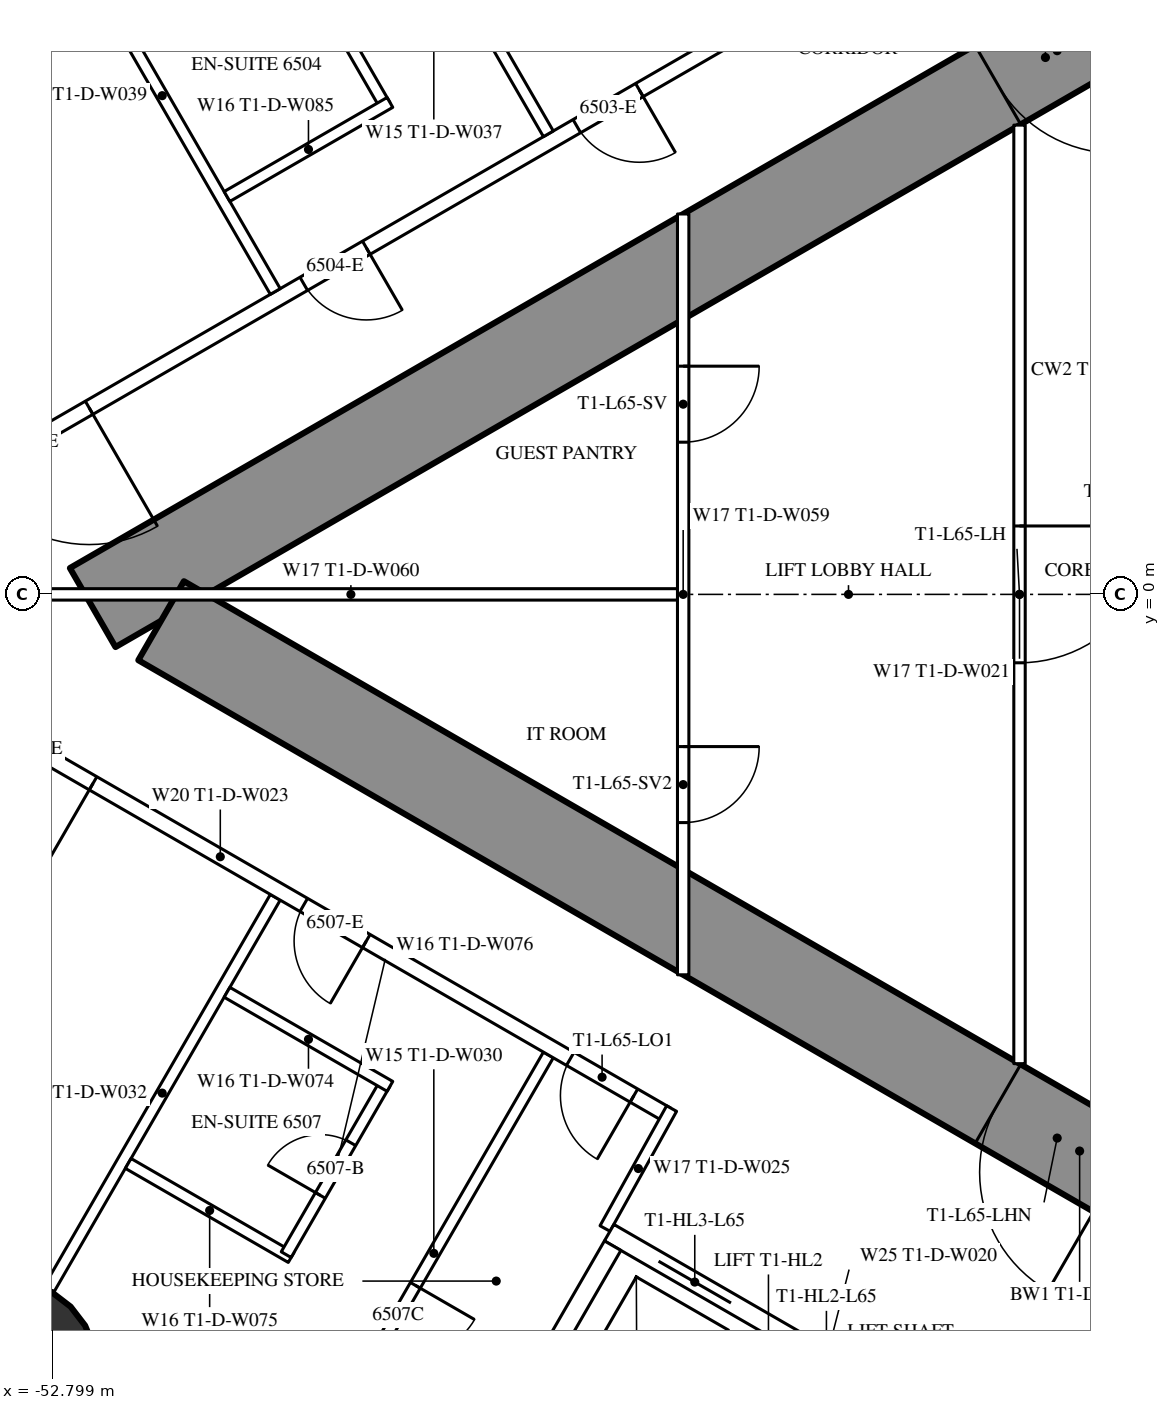
"""IFC4 building model, lengths in metres.
Left out: names, types, materials, properties, quantities, classifications, styles, units other than length and angle.
Written with IfcOpenShell. Run it as: python <this file> out.ifc"""

import sys

from ifc_helpers import new_model, si_unit, direction, frame, frame_2d, origin, origin_2d, place, context, subcontext, project, spatial, rectangle, circle, extrude, element, fill, save


model = new_model("IFC4")
c1 = context("Model", 3, precision=1e-05, world=origin(), true_north=direction((0.0, 1.0)))
c2 = subcontext(c1, "Body", "Model", "MODEL_VIEW")
j1 = project(units=[si_unit("LENGTHUNIT", "METRE"), si_unit("PLANEANGLEUNIT", "RADIAN")], contexts=[c1])
p1 = place(None, origin())
s1 = spatial("IfcSite", under=j1, at=p1, CompositionType="ELEMENT")
p2 = place(p1, origin())
s2 = spatial("IfcBuilding", under=s1, at=p2, CompositionType="ELEMENT")
p3 = place(p2, frame((0.0, 0.0, 244.1)))
s3 = spatial("IfcBuildingStorey", under=s2, at=p3, CompositionType="ELEMENT", Elevation=244.1)
p4 = place(p3, frame((-53.408, -10.219, 0.0), z_axis=(0.0, 0.0, 1.0), x_axis=(1.0, 0.0, 0.0)))
e1 = element("IfcColumn", 1, at=p4, inside=s3, PredefinedType="COLUMN", context=c2, shape_type="SweptSolid", body=[
    extrude(circle(Radius=1.2, at=origin_2d()), origin(), (0.0, 0.0, 1.0), 3.6),
])
p5 = place(p3, frame((-27.2, 14.3, 0.0), z_axis=(0.0, 0.0, 1.0), x_axis=(-0.866026593062, -0.499997940104, 0.0)))
e2 = element("IfcWall", 2, at=p5, inside=s3, PredefinedType="SHEAR", context=c2, shape_type="SweptSolid", body=[
    extrude(rectangle(XDim=28.946, YDim=1.2, at=frame_2d((14.473, 0.0))), origin(), (0.0, 0.0, 1.0), 3.6),
])
p6 = place(p5, frame((4.6, 0.0, 0.0)))
e3 = element("IfcOpeningElement", 3, at=p6, cuts=e2, PredefinedType="OPENING", context=c2, shape_type="SweptSolid", body=[
    extrude(rectangle(XDim=1.0, YDim=2.2, at=frame_2d((0.5, 1.1))), frame((0.0, 0.61, 0.0), z_axis=(0.0, -1.0, 0.0), x_axis=(1.0, 0.0, 0.0)), (0.0, 0.0, 1.0), 1.22),
])
p7 = place(p5, frame((13.395, 0.0, 0.0)))
e4 = element("IfcOpeningElement", 4, at=p7, cuts=e2, PredefinedType="OPENING", context=c2, shape_type="SweptSolid", body=[
    extrude(rectangle(XDim=1.8, YDim=2.2, at=frame_2d((0.9, 1.1))), frame((0.0, 0.61, 0.0), z_axis=(0.0, -1.0, 0.0), x_axis=(1.0, 0.0, 0.0)), (0.0, 0.0, 1.0), 1.22),
])
p8 = place(p3, frame((-27.2, -14.3, 0.0), z_axis=(0.0, 0.0, 1.0), x_axis=(-0.866024021859, 0.500002393557, 0.0)))
e5 = element("IfcWall", 5, at=p8, inside=s3, PredefinedType="SHEAR", context=c2, shape_type="SweptSolid", body=[
    extrude(rectangle(XDim=27.907, YDim=1.2, at=frame_2d((13.954, 0.0))), origin(), (0.0, 0.0, 1.0), 3.6),
])
p9 = place(p8, frame((4.6, 0.0, 0.0)))
e6 = element("IfcOpeningElement", 6, at=p9, cuts=e5, PredefinedType="OPENING", context=c2, shape_type="SweptSolid", body=[
    extrude(rectangle(XDim=1.0, YDim=2.2, at=frame_2d((0.5, 1.1))), frame((0.0, 0.61, 0.0), z_axis=(0.0, -1.0, 0.0), x_axis=(1.0, 0.0, 0.0)), (0.0, 0.0, 1.0), 1.22),
])
p10 = place(p8, frame((13.395, 0.0, 0.0)))
e7 = element("IfcOpeningElement", 7, at=p10, cuts=e5, PredefinedType="OPENING", context=c2, shape_type="SweptSolid", body=[
    extrude(rectangle(XDim=1.8, YDim=2.2, at=frame_2d((0.9, 1.1))), frame((0.0, 0.61, 0.0), z_axis=(0.0, -1.0, 0.0), x_axis=(1.0, 0.0, 0.0)), (0.0, 0.0, 1.0), 1.22),
])
p11 = place(p3, frame((-28.737, 16.068, 0.0), z_axis=(0.0, 0.0, 1.0), x_axis=(-0.866026057212, -0.499998868229, 0.0)))
e8 = element("IfcWall", 8, at=p11, inside=s3, PredefinedType="PARTITIONING", context=c2, shape_type="SweptSolid", body=[
    extrude(rectangle(XDim=32.137, YDim=0.2, at=frame_2d((16.068, 0.0))), origin(), (0.0, 0.0, 1.0), 3.35),
])
p12 = place(p11, frame((1.08, 0.0, 0.0)))
e9 = element("IfcOpeningElement", 9, at=p12, cuts=e8, PredefinedType="OPENING", context=c2, shape_type="SweptSolid", body=[
    extrude(rectangle(XDim=1.8, YDim=2.04, at=frame_2d((0.9, 1.02))), frame((0.0, 0.11, 0.0), z_axis=(0.0, -1.0, 0.0), x_axis=(1.0, 0.0, 0.0)), (0.0, 0.0, 1.0), 0.22),
])
p13 = place(p11, frame((6.86, 0.0, 0.0)))
e10 = element("IfcOpeningElement", 10, at=p13, cuts=e8, PredefinedType="OPENING", context=c2, shape_type="SweptSolid", body=[
    extrude(rectangle(XDim=1.0, YDim=2.2, at=frame_2d((0.5, 1.1))), frame((0.0, 0.11, 0.0), z_axis=(0.0, -1.0, 0.0), x_axis=(1.0, 0.0, 0.0)), (0.0, 0.0, 1.0), 0.22),
])
p14 = place(p11, frame((18.867, 0.0, 0.0)))
e11 = element("IfcOpeningElement", 11, at=p14, cuts=e8, PredefinedType="OPENING", context=c2, shape_type="SweptSolid", body=[
    extrude(rectangle(XDim=0.95, YDim=2.2, at=frame_2d((0.475, 1.1))), frame((0.0, 0.11, 0.0), z_axis=(0.0, -1.0, 0.0), x_axis=(1.0, 0.0, 0.0)), (0.0, 0.0, 1.0), 0.22),
])
p15 = place(p11, frame((23.015, 0.0, 0.0)))
e12 = element("IfcOpeningElement", 12, at=p15, cuts=e8, PredefinedType="OPENING", context=c2, shape_type="SweptSolid", body=[
    extrude(rectangle(XDim=0.95, YDim=2.2, at=frame_2d((0.475, 1.1))), frame((0.0, 0.11, 0.0), z_axis=(0.0, -1.0, 0.0), x_axis=(1.0, 0.0, 0.0)), (0.0, 0.0, 1.0), 0.22),
])
p16 = place(p11, frame((27.226, 0.0, 0.0)))
e13 = element("IfcOpeningElement", 13, at=p16, cuts=e8, PredefinedType="OPENING", context=c2, shape_type="SweptSolid", body=[
    extrude(rectangle(XDim=1.8, YDim=2.2, at=frame_2d((0.9, 1.1))), frame((0.0, 0.11, 0.0), z_axis=(0.0, -1.0, 0.0), x_axis=(1.0, 0.0, 0.0)), (0.0, 0.0, 1.0), 0.22),
])
p17 = place(p3, frame((-46.274, 6.059, 0.0), z_axis=(0.0, 0.0, 1.0), x_axis=(-0.500020471368, 0.866013584312, 0.0)))
e14 = element("IfcWall", 14, at=p17, inside=s3, PredefinedType="PARTITIONING", context=c2, shape_type="SweptSolid", body=[
    extrude(rectangle(XDim=6.028, YDim=0.15, at=frame_2d((3.014, 0.0))), origin(), (0.0, 0.0, 1.0), 2.45),
])
p18 = place(p3, frame((-49.866, 3.985, 0.0), z_axis=(0.0, 0.0, 1.0), x_axis=(-0.500000694566, 0.866025002776, 0.0)))
e15 = element("IfcWall", 15, at=p18, inside=s3, PredefinedType="PARTITIONING", context=c2, shape_type="SweptSolid", body=[
    extrude(rectangle(XDim=5.95, YDim=0.15, at=frame_2d((2.975, 0.0))), origin(), (0.0, 0.0, 1.0), 2.45),
])
p19 = place(p3, frame((-46.274, -6.059, 0.0), z_axis=(0.0, 0.0, 1.0), x_axis=(-0.500020471368, -0.866013584312, 0.0)))
e16 = element("IfcWall", 16, at=p19, inside=s3, PredefinedType="PARTITIONING", context=c2, shape_type="SweptSolid", body=[
    extrude(rectangle(XDim=6.028, YDim=0.15, at=frame_2d((3.014, 0.0))), origin(), (0.0, 0.0, 1.0), 2.45),
])
p20 = place(p19, frame((3.5, 0.0, 0.0)))
e17 = element("IfcOpeningElement", 17, at=p20, cuts=e16, PredefinedType="OPENING", context=c2, shape_type="SweptSolid", body=[
    extrude(rectangle(XDim=0.9, YDim=2.2, at=frame_2d((0.45, 1.1))), frame((0.0, 0.085, 0.0), z_axis=(0.0, -1.0, 0.0), x_axis=(1.0, 0.0, 0.0)), (0.0, 0.0, 1.0), 0.17),
])
p21 = place(p3, frame((-49.866, -3.985, 0.0), z_axis=(0.0, 0.0, 1.0), x_axis=(-0.500000694566, -0.866025002776, 0.0)))
e18 = element("IfcWall", 18, at=p21, inside=s3, PredefinedType="PARTITIONING", context=c2, shape_type="SweptSolid", body=[
    extrude(rectangle(XDim=5.95, YDim=0.15, at=frame_2d((2.975, 0.0))), origin(), (0.0, 0.0, 1.0), 2.45),
])
p22 = place(p3, frame((-44.715, -6.844, 0.0), z_axis=(0.0, 0.0, 1.0), x_axis=(-0.866025261224, 0.500000246922, 0.0)))
e19 = element("IfcWall", 19, at=p22, inside=s3, PredefinedType="PARTITIONING", context=c2, shape_type="SweptSolid", body=[
    extrude(rectangle(XDim=13.567, YDim=0.2, at=frame_2d((6.783, 0.0))), origin(), (0.0, 0.0, 1.0), 3.35),
])
p23 = place(p22, frame((8.716, 0.0, 0.0)))
e20 = element("IfcOpeningElement", 20, at=p23, cuts=e19, PredefinedType="OPENING", context=c2, shape_type="SweptSolid", body=[
    extrude(rectangle(XDim=1.8, YDim=2.2, at=frame_2d((0.9, 1.1))), frame((0.0, 0.11, 0.0), z_axis=(0.0, -1.0, 0.0), x_axis=(1.0, 0.0, 0.0)), (0.0, 0.0, 1.0), 0.22),
])
p24 = place(p22, frame((4.565, 0.0, 0.0)))
e21 = element("IfcOpeningElement", 21, at=p24, cuts=e19, PredefinedType="OPENING", context=c2, shape_type="SweptSolid", body=[
    extrude(rectangle(XDim=0.95, YDim=2.2, at=frame_2d((0.475, 1.1))), frame((0.0, 0.11, 0.0), z_axis=(0.0, -1.0, 0.0), x_axis=(1.0, 0.0, 0.0)), (0.0, 0.0, 1.0), 0.22),
])
p25 = place(p22, frame((0.5, 0.0, 0.0)))
e22 = element("IfcOpeningElement", 22, at=p25, cuts=e19, PredefinedType="OPENING", context=c2, shape_type="SweptSolid", body=[
    extrude(rectangle(XDim=0.967, YDim=2.2, at=frame_2d((0.483, 1.1))), frame((0.0, 0.11, 0.0), z_axis=(0.0, -1.0, 0.0), x_axis=(1.0, 0.0, 0.0)), (0.0, 0.0, 1.0), 0.22),
])
p26 = place(p3, frame((-44.652, -6.764, 0.0), z_axis=(0.0, 0.0, 1.0), x_axis=(-0.485424724123, -0.874278466629, 0.0)))
e23 = element("IfcWall", 23, at=p26, inside=s3, PredefinedType="PARTITIONING", context=c2, shape_type="SweptSolid", body=[
    extrude(rectangle(XDim=1.805, YDim=0.15, at=frame_2d((0.903, 0.0))), origin(), (0.0, 0.0, 1.0), 3.35),
])
p27 = place(p3, frame((-48.423, 6.435, 0.0), z_axis=(0.0, 0.0, 1.0), x_axis=(-0.500006934395, 0.866021400173, 0.0)))
e24 = element("IfcWall", 24, at=p27, inside=s3, PredefinedType="PARTITIONING", context=c2, shape_type="SweptSolid", body=[
    extrude(rectangle(XDim=2.6, YDim=0.15, at=frame_2d((1.3, 0.0))), origin(), (0.0, 0.0, 1.0), 3.35),
])
p28 = place(p27, frame((0.9, 0.0, 0.0)))
e25 = element("IfcOpeningElement", 25, at=p28, cuts=e24, PredefinedType="OPENING", context=c2, shape_type="SweptSolid", body=[
    extrude(rectangle(XDim=0.8, YDim=2.2, at=frame_2d((0.4, 1.1))), frame((0.0, 0.085, 0.0), z_axis=(0.0, -1.0, 0.0), x_axis=(1.0, 0.0, 0.0)), (0.0, 0.0, 1.0), 0.17),
])
for number, where, z_axis, x_axis in (
    (26, (-48.358, 6.472, 0.0), (0.0, 0.0, 1.0), (-0.866, -0.5, 0.0)),
    (27, (-49.658, -8.724, 0.0), (0.0, 0.0, 1.0), (-0.866, 0.5, 0.0)),
):
    element("IfcWall", number, at=place(p3, frame(where, z_axis=z_axis, x_axis=x_axis)), inside=s3, PredefinedType="PARTITIONING", context=c2, shape_type="SweptSolid", body=[
        extrude(rectangle(XDim=2.475, YDim=0.15, at=frame_2d((1.238, 0.0))), origin(), (0.0, 0.0, 1.0), 3.35),
    ])
p29 = place(p3, frame((-48.423, -6.435, 0.0), z_axis=(0.0, 0.0, 1.0), x_axis=(-0.500006934395, -0.866021400173, 0.0)))
e28 = element("IfcWall", 28, at=p29, inside=s3, PredefinedType="PARTITIONING", context=c2, shape_type="SweptSolid", body=[
    extrude(rectangle(XDim=2.6, YDim=0.15, at=frame_2d((1.3, 0.0))), origin(), (0.0, 0.0, 1.0), 3.35),
])
p30 = place(p29, frame((0.9, 0.0, 0.0)))
e29 = element("IfcOpeningElement", 29, at=p30, cuts=e28, PredefinedType="OPENING", context=c2, shape_type="SweptSolid", body=[
    extrude(rectangle(XDim=0.8, YDim=2.2, at=frame_2d((0.4, 1.1))), frame((0.0, 0.085, 0.0), z_axis=(0.0, -1.0, 0.0), x_axis=(1.0, 0.0, 0.0)), (0.0, 0.0, 1.0), 0.17),
])
p31 = place(p3, frame((-48.358, -6.472, 0.0), z_axis=(0.0, 0.0, 1.0), x_axis=(-0.866073894602, 0.499916002032, 0.0)))
e30 = element("IfcWall", 30, at=p31, inside=s3, PredefinedType="PARTITIONING", context=c2, shape_type="SweptSolid", body=[
    extrude(rectangle(XDim=2.475, YDim=0.15, at=frame_2d((1.238, 0.0))), origin(), (0.0, 0.0, 1.0), 2.5),
])
p32 = place(p3, frame((-40.075, 6.174, 0.0), z_axis=(0.0, 0.0, 1.0), x_axis=(0.0, -1.0, 0.0)))
e31 = element("IfcWall", 31, at=p32, inside=s3, PredefinedType="PARTITIONING", context=c2, shape_type="SweptSolid", body=[
    extrude(rectangle(XDim=12.348, YDim=0.15, at=frame_2d((6.174, 0.0))), origin(), (0.0, 0.0, 1.0), 3.35),
])
p33 = place(p32, frame((5.274, 0.0, 0.0)))
e32 = element("IfcOpeningElement", 32, at=p33, cuts=e31, PredefinedType="OPENING", context=c2, shape_type="SweptSolid", body=[
    extrude(rectangle(XDim=1.8, YDim=2.2, at=frame_2d((0.9, 1.1))), frame((0.0, 0.085, 0.0), z_axis=(0.0, -1.0, 0.0), x_axis=(1.0, 0.0, 0.0)), (0.0, 0.0, 1.0), 0.17),
])
p34 = place(p3, frame((-44.5, 5.005, 0.0), z_axis=(0.0, 0.0, 1.0), x_axis=(0.0, -1.0, 0.0)))
e33 = element("IfcWall", 33, at=p34, inside=s3, PredefinedType="PARTITIONING", context=c2, shape_type="SweptSolid", body=[
    extrude(rectangle(XDim=10.009, YDim=0.15, at=frame_2d((5.005, 0.0))), origin(), (0.0, 0.0, 1.0), 2.5),
])
p35 = place(p34, frame((2.002, 0.0, 0.0)))
e34 = element("IfcOpeningElement", 34, at=p35, cuts=e33, PredefinedType="OPENING", context=c2, shape_type="SweptSolid", body=[
    extrude(rectangle(XDim=1.0, YDim=2.2, at=frame_2d((0.5, 1.1))), frame((0.0, 0.085, 0.0), z_axis=(0.0, -1.0, 0.0), x_axis=(1.0, 0.0, 0.0)), (0.0, 0.0, 1.0), 0.17),
])
p36 = place(p34, frame((7.007, 0.0, 0.0)))
e35 = element("IfcOpeningElement", 35, at=p36, cuts=e33, PredefinedType="OPENING", context=c2, shape_type="SweptSolid", body=[
    extrude(rectangle(XDim=1.0, YDim=2.2, at=frame_2d((0.5, 1.1))), frame((0.0, 0.085, 0.0), z_axis=(0.0, -1.0, 0.0), x_axis=(1.0, 0.0, 0.0)), (0.0, 0.0, 1.0), 0.17),
])
p37 = place(p3, frame((-44.575, 0.0, 0.0), z_axis=(0.0, 0.0, 1.0), x_axis=(-1.0, 0.0, 0.0)))
e36 = element("IfcWall", 36, at=p37, inside=s3, PredefinedType="PARTITIONING", context=c2, shape_type="SweptSolid", body=[
    extrude(rectangle(XDim=8.593, YDim=0.15, at=frame_2d((4.297, 0.0))), origin(), (0.0, 0.0, 1.0), 2.45),
])
p38 = place(p3, frame((-39.758, -11.697, 0.0), z_axis=(0.0, 0.0, 1.0), x_axis=(-0.866024194504, 0.500002094529, 0.0)))
e37 = element("IfcWall", 37, at=p38, inside=s3, PredefinedType="PARTITIONING", context=c2, shape_type="SweptSolid", body=[
    extrude(rectangle(XDim=6.6, YDim=0.25, at=frame_2d((3.3, 0.0))), origin(), (0.0, 0.0, 1.0), 3.35),
])
p39 = place(p38, frame((0.75, 0.0, 0.0)))
e38 = element("IfcOpeningElement", 38, at=p39, cuts=e37, PredefinedType="OPENING", context=c2, shape_type="SweptSolid", body=[
    extrude(rectangle(XDim=1.1, YDim=2.2, at=frame_2d((0.55, 1.1))), frame((0.0, 0.135, 0.0), z_axis=(0.0, -1.0, 0.0), x_axis=(1.0, 0.0, 0.0)), (0.0, 0.0, 1.0), 0.27),
])
p40 = place(p38, frame((2.75, 0.0, 0.0)))
e39 = element("IfcOpeningElement", 39, at=p40, cuts=e37, PredefinedType="OPENING", context=c2, shape_type="SweptSolid", body=[
    extrude(rectangle(XDim=1.1, YDim=2.2, at=frame_2d((0.55, 1.1))), frame((0.0, 0.135, 0.0), z_axis=(0.0, -1.0, 0.0), x_axis=(1.0, 0.0, 0.0)), (0.0, 0.0, 1.0), 0.27),
])
p41 = place(p38, frame((4.75, 0.0, 0.0)))
e40 = element("IfcOpeningElement", 40, at=p41, cuts=e37, PredefinedType="OPENING", context=c2, shape_type="SweptSolid", body=[
    extrude(rectangle(XDim=1.1, YDim=2.2, at=frame_2d((0.55, 1.1))), frame((0.0, 0.135, 0.0), z_axis=(0.0, -1.0, 0.0), x_axis=(1.0, 0.0, 0.0)), (0.0, 0.0, 1.0), 0.27),
])
p42 = place(p3, frame((-45.428, -8.568, 0.0), z_axis=(0.0, 0.0, 1.0), x_axis=(-0.499929347863, -0.866066190972, 0.0)))
e41 = element("IfcWall", 41, at=p42, inside=s3, PredefinedType="PARTITIONING", context=c2, shape_type="SweptSolid", body=[
    extrude(rectangle(XDim=3.201, YDim=0.25, at=frame_2d((1.6, 0.0))), origin(), (0.0, 0.0, 1.0), 3.35),
])
p43 = place(p14, origin())
e42 = element("IfcDoor", 42, at=p43, inside=s3, OperationType="SINGLE_SWING_LEFT", PredefinedType="DOOR", context=c2, shape_type="SweptSolid", body=[
    extrude(rectangle(XDim=0.95, YDim=2.2, at=frame_2d((0.475, 1.1))), frame((0.0, 0.025, 0.0), z_axis=(0.0, -1.0, 0.0), x_axis=(1.0, 0.0, 0.0)), (0.0, 0.0, 1.0), 0.05),
])
fill(e11, e42)
p44 = place(p15, origin())
e43 = element("IfcDoor", 43, at=p44, inside=s3, OperationType="SINGLE_SWING_LEFT", PredefinedType="DOOR", context=c2, shape_type="SweptSolid", body=[
    extrude(rectangle(XDim=0.95, YDim=2.2, at=frame_2d((0.475, 1.1))), frame((0.0, 0.025, 0.0), z_axis=(0.0, -1.0, 0.0), x_axis=(1.0, 0.0, 0.0)), (0.0, 0.0, 1.0), 0.05),
])
fill(e12, e43)
p45 = place(p16, origin())
e44 = element("IfcDoor", 44, at=p45, inside=s3, OperationType="DOUBLE_DOOR_SINGLE_SWING", PredefinedType="DOOR", context=c2, shape_type="SweptSolid", body=[
    extrude(rectangle(XDim=1.8, YDim=2.2, at=frame_2d((0.9, 1.1))), frame((0.0, 0.025, 0.0), z_axis=(0.0, -1.0, 0.0), x_axis=(1.0, 0.0, 0.0)), (0.0, 0.0, 1.0), 0.05),
])
fill(e13, e44)
p46 = place(p23, origin())
e45 = element("IfcDoor", 45, at=p46, inside=s3, OperationType="DOUBLE_DOOR_SINGLE_SWING", PredefinedType="DOOR", context=c2, shape_type="SweptSolid", body=[
    extrude(rectangle(XDim=1.8, YDim=2.2, at=frame_2d((0.9, 1.1))), frame((0.0, 0.025, 0.0), z_axis=(0.0, -1.0, 0.0), x_axis=(1.0, 0.0, 0.0)), (0.0, 0.0, 1.0), 0.05),
])
fill(e20, e45)
p47 = place(p30, origin())
e46 = element("IfcDoor", 46, at=p47, inside=s3, OperationType="SINGLE_SWING_RIGHT", PredefinedType="DOOR", context=c2, shape_type="SweptSolid", body=[
    extrude(rectangle(XDim=0.8, YDim=2.2, at=frame_2d((0.4, 1.1))), frame((0.0, 0.025, 0.0), z_axis=(0.0, -1.0, 0.0), x_axis=(1.0, 0.0, 0.0)), (0.0, 0.0, 1.0), 0.05),
])
fill(e29, e46)
p48 = place(p24, origin())
e47 = element("IfcDoor", 47, at=p48, inside=s3, OperationType="SINGLE_SWING_LEFT", PredefinedType="DOOR", context=c2, shape_type="SweptSolid", body=[
    extrude(rectangle(XDim=0.95, YDim=2.2, at=frame_2d((0.475, 1.1))), frame((0.0, 0.025, 0.0), z_axis=(0.0, -1.0, 0.0), x_axis=(1.0, 0.0, 0.0)), (0.0, 0.0, 1.0), 0.05),
])
fill(e21, e47)
p49 = place(p25, origin())
e48 = element("IfcDoor", 48, at=p49, inside=s3, OperationType="SINGLE_SWING_LEFT", PredefinedType="DOOR", context=c2, shape_type="SweptSolid", body=[
    extrude(rectangle(XDim=0.967, YDim=2.2, at=frame_2d((0.483, 1.1))), frame((0.0, 0.025, 0.0), z_axis=(0.0, -1.0, 0.0), x_axis=(1.0, 0.0, 0.0)), (0.0, 0.0, 1.0), 0.05),
])
fill(e22, e48)
p50 = place(p20, origin())
e49 = element("IfcDoor", 49, at=p50, inside=s3, OperationType="SINGLE_SWING_LEFT", PredefinedType="DOOR", context=c2, shape_type="SweptSolid", body=[
    extrude(rectangle(XDim=0.9, YDim=2.2, at=frame_2d((0.45, 1.1))), frame((0.0, 0.025, 0.0), z_axis=(0.0, -1.0, 0.0), x_axis=(1.0, 0.0, 0.0)), (0.0, 0.0, 1.0), 0.05),
])
fill(e17, e49)
p51 = place(p33, origin())
e50 = element("IfcDoor", 50, at=p51, inside=s3, OperationType="DOUBLE_DOOR_SINGLE_SWING", PredefinedType="DOOR", context=c2, shape_type="SweptSolid", body=[
    extrude(rectangle(XDim=1.8, YDim=2.2, at=frame_2d((0.9, 1.1))), frame((0.0, 0.025, 0.0), z_axis=(0.0, -1.0, 0.0), x_axis=(1.0, 0.0, 0.0)), (0.0, 0.0, 1.0), 0.05),
])
fill(e32, e50)
p52 = place(p35, origin())
e51 = element("IfcDoor", 51, at=p52, inside=s3, OperationType="SINGLE_SWING_LEFT", PredefinedType="DOOR", context=c2, shape_type="SweptSolid", body=[
    extrude(rectangle(XDim=1.0, YDim=2.2, at=frame_2d((0.5, 1.1))), frame((0.0, 0.025, 0.0), z_axis=(0.0, -1.0, 0.0), x_axis=(1.0, 0.0, 0.0)), (0.0, 0.0, 1.0), 0.05),
])
fill(e34, e51)
p53 = place(p36, origin())
e52 = element("IfcDoor", 52, at=p53, inside=s3, OperationType="SINGLE_SWING_LEFT", PredefinedType="DOOR", context=c2, shape_type="SweptSolid", body=[
    extrude(rectangle(XDim=1.0, YDim=2.2, at=frame_2d((0.5, 1.1))), frame((0.0, 0.025, 0.0), z_axis=(0.0, -1.0, 0.0), x_axis=(1.0, 0.0, 0.0)), (0.0, 0.0, 1.0), 0.05),
])
fill(e35, e52)
p54 = place(p7, origin())
e53 = element("IfcDoor", 53, at=p54, inside=s3, OperationType="DOUBLE_DOOR_SINGLE_SWING", PredefinedType="DOOR", context=c2, shape_type="SweptSolid", body=[
    extrude(rectangle(XDim=1.8, YDim=2.2, at=frame_2d((0.9, 1.1))), frame((0.0, 0.025, 0.0), z_axis=(0.0, -1.0, 0.0), x_axis=(1.0, 0.0, 0.0)), (0.0, 0.0, 1.0), 0.05),
])
fill(e4, e53)
p55 = place(p10, origin())
e54 = element("IfcDoor", 54, at=p55, inside=s3, OperationType="DOUBLE_DOOR_SINGLE_SWING", PredefinedType="DOOR", context=c2, shape_type="SweptSolid", body=[
    extrude(rectangle(XDim=1.8, YDim=2.2, at=frame_2d((0.9, 1.1))), frame((0.0, 0.025, 0.0), z_axis=(0.0, -1.0, 0.0), x_axis=(1.0, 0.0, 0.0)), (0.0, 0.0, 1.0), 0.05),
])
fill(e7, e54)
p56 = place(p41, origin())
e55 = element("IfcDoor", 55, at=p56, inside=s3, OperationType="DOUBLE_DOOR_SLIDING", PredefinedType="USERDEFINED", context=c2, shape_type="SweptSolid", body=[
    extrude(rectangle(XDim=1.1, YDim=2.2, at=frame_2d((0.55, 1.1))), frame((0.0, 0.025, 0.0), z_axis=(0.0, -1.0, 0.0), x_axis=(1.0, 0.0, 0.0)), (0.0, 0.0, 1.0), 0.05),
])
fill(e40, e55)
save(model, sys.argv[1])
